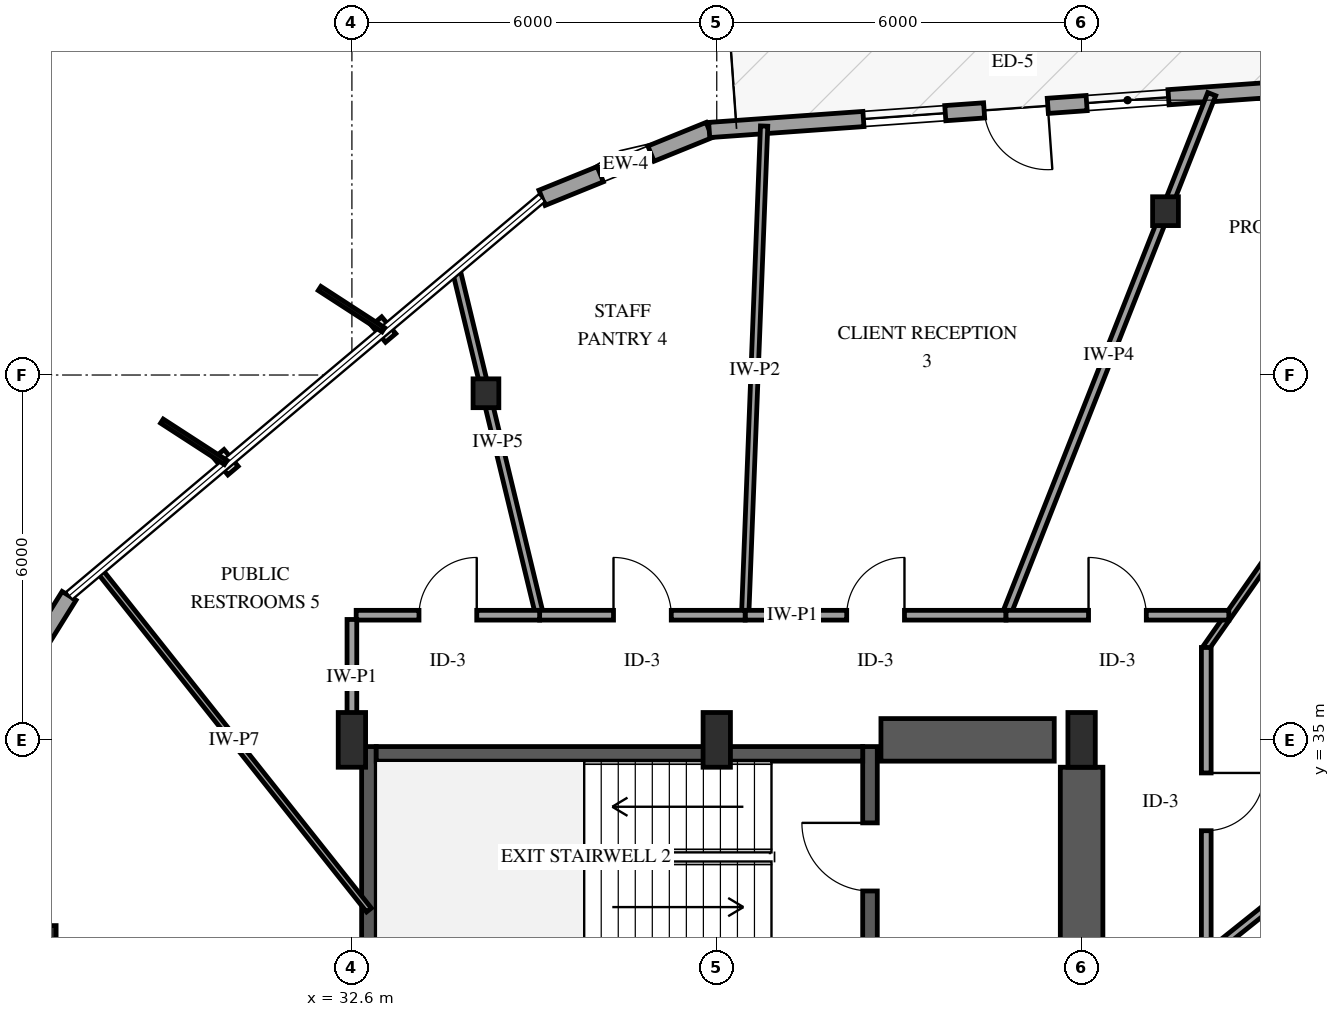
"""IFC4 building model, lengths in metres.
Left out: names, types, materials, properties, quantities, classifications, styles, units other than length and angle.
Written with IfcOpenShell. Run it as: python <this file> out.ifc"""

import sys

from ifc_helpers import new_model, si_unit, direction, frame, frame_2d, origin, origin_2d, place, context, subcontext, project, spatial, rectangle, i_section, extrude, element, fill, save


model = new_model("IFC4")
c1 = context("Model", 3, precision=1e-05, world=origin(), true_north=direction((0.0, 1.0)))
c2 = subcontext(c1, "Body", "Model", "MODEL_VIEW")
j1 = project(units=[si_unit("LENGTHUNIT", "METRE"), si_unit("PLANEANGLEUNIT", "RADIAN")], contexts=[c1])
p1 = place(None, origin())
s1 = spatial("IfcSite", under=j1, at=p1, CompositionType="ELEMENT")
p2 = place(p1, origin())
s2 = spatial("IfcBuilding", under=s1, at=p2, CompositionType="ELEMENT")
p3 = place(p2, frame((0.0, 0.0, 42.6)))
s3 = spatial("IfcBuildingStorey", under=s2, at=p3, CompositionType="ELEMENT", Elevation=42.6)
p4 = place(p3, frame((32.88, 31.26, 0.0), z_axis=(0.0, 0.0, 1.0), x_axis=(0.0, 1.0, 0.0)))
e1 = element("IfcWall", 1, at=p4, inside=s3, PredefinedType="SHEAR", context=c2, shape_type="SweptSolid", body=[
    extrude(rectangle(XDim=3.63, YDim=0.24, at=frame_2d((1.815, 0.0))), origin(), (0.0, 0.0, 1.0), 4.0),
])
p5 = place(p3, frame((41.12, 31.26, 0.0), z_axis=(0.0, 0.0, 1.0), x_axis=(0.0, 1.0, 0.0)))
e2 = element("IfcWall", 2, at=p5, inside=s3, PredefinedType="SHEAR", context=c2, shape_type="SweptSolid", body=[
    extrude(rectangle(XDim=3.63, YDim=0.24, at=frame_2d((1.815, 0.0))), origin(), (0.0, 0.0, 1.0), 4.0),
])
p6 = place(p5, frame((1.255, 0.0, 0.0)))
e3 = element("IfcOpeningElement", 3, at=p6, cuts=e2, PredefinedType="OPENING", context=c2, shape_type="SweptSolid", body=[
    extrude(rectangle(XDim=1.12, YDim=2.15, at=frame_2d((0.56, 1.075))), frame((0.0, 0.13, 0.0), z_axis=(0.0, -1.0, 0.0), x_axis=(1.0, 0.0, 0.0)), (0.0, 0.0, 1.0), 0.26),
])
p7 = place(p3, frame((33.0, 34.77, 0.0), z_axis=(0.0, 0.0, 1.0), x_axis=(1.0, 0.0, 0.0)))
e4 = element("IfcWall", 4, at=p7, inside=s3, PredefinedType="SHEAR", context=c2, shape_type="SweptSolid", body=[
    extrude(rectangle(XDim=8.0, YDim=0.24, at=frame_2d((4.0, 0.0))), origin(), (0.0, 0.0, 1.0), 4.0),
])
p8 = place(p3, frame((41.3, 35.0, 0.0), z_axis=(0.0, 0.0, 1.0), x_axis=(1.0, 0.0, 0.0)))
e5 = element("IfcWall", 5, at=p8, inside=s3, PredefinedType="SHEAR", context=c2, shape_type="SweptSolid", body=[
    extrude(rectangle(XDim=2.85, YDim=0.7, at=frame_2d((1.425, 0.0))), origin(), (0.0, 0.0, 1.0), 4.0),
])
p9 = place(p3, frame((44.6, 29.8, 0.0), z_axis=(0.0, 0.0, 1.0), x_axis=(0.0, 1.0, 0.0)))
e6 = element("IfcWall", 6, at=p9, inside=s3, PredefinedType="SHEAR", context=c2, shape_type="SweptSolid", body=[
    extrude(rectangle(XDim=4.75, YDim=0.7, at=frame_2d((2.375, 0.0))), origin(), (0.0, 0.0, 1.0), 4.0),
])
for number, where, z_axis, x_axis in (
    (7, (32.6, 35.0, 0.0), (0.0, 0.0, 1.0), (1.0, 0.0, 0.0)),
    (8, (38.6, 35.0, 0.0), (0.0, 0.0, 1.0), (1.0, 0.0, 0.0)),
    (9, (44.6, 35.0, 0.0), (0.0, 0.0, 1.0), (1.0, 0.0, 0.0)),
):
    element("IfcColumn", number, at=place(p3, frame(where, z_axis=z_axis, x_axis=x_axis)), inside=s3, PredefinedType="PILASTER", context=c2, shape_type="SweptSolid", body=[
        extrude(rectangle(XDim=0.45, YDim=0.9, at=origin_2d()), origin(), (0.0, 0.0, 1.0), 4.0),
    ])
for number, where, z_axis, x_axis in (
    (10, (45.98, 43.694, 0.0), (0.0, 0.0, 1.0), (1.0, 0.0, 0.0)),
    (11, (34.804, 40.7, 0.0), (0.0, 0.0, 1.0), (1.0, 0.0, 0.0)),
    (12, (27.523, 31.708, 0.0), (0.0, 0.0, 1.0), (1.0, 0.0, 0.0)),
):
    element("IfcColumn", number, at=place(p3, frame(where, z_axis=z_axis, x_axis=x_axis)), inside=s3, PredefinedType="COLUMN", context=c2, shape_type="SweptSolid", body=[
        extrude(i_section(OverallWidth=0.424, OverallDepth=0.474, WebThickness=0.048, FlangeThickness=0.077, FilletRadius=0.038, at=origin_2d()), origin(), (0.0, 0.0, 1.0), 4.0),
    ])
p10 = place(p3, frame((38.476, 45.029, 0.0), z_axis=(0.0, 0.0, 1.0), x_axis=(-0.926649408299, -0.375926687132, 0.0)))
e13 = element("IfcWall", 13, at=p10, inside=s3, PredefinedType="SOLIDWALL", context=c2, shape_type="SweptSolid", body=[
    extrude(rectangle(XDim=2.967, YDim=0.27, at=frame_2d((1.483, 0.0))), origin(), (0.0, 0.0, 1.0), 3.079),
])
p11 = place(p10, frame((1.033, 0.0, 0.75)))
e14 = element("IfcOpeningElement", 14, at=p11, cuts=e13, PredefinedType="OPENING", context=c2, shape_type="SweptSolid", body=[
    extrude(rectangle(XDim=0.9, YDim=1.5, at=frame_2d((0.45, 0.75))), frame((0.0, 0.145, 0.0), z_axis=(0.0, -1.0, 0.0), x_axis=(1.0, 0.0, 0.0)), (0.0, 0.0, 1.0), 0.29),
])
p12 = place(p3, frame((48.615, 45.752, 0.0), z_axis=(0.0, 0.0, 1.0), x_axis=(-0.997466374724, -0.071139519923, 0.0)))
e15 = element("IfcWall", 15, at=p12, inside=s3, PredefinedType="SOLIDWALL", context=c2, shape_type="SweptSolid", body=[
    extrude(rectangle(XDim=10.165, YDim=0.25, at=frame_2d((5.083, 0.0))), origin(), (0.0, 0.0, 1.0), 3.079),
])
p13 = place(p12, frame((4.583, 0.0, 0.0)))
e16 = element("IfcOpeningElement", 16, at=p13, cuts=e15, PredefinedType="OPENING", context=c2, shape_type="SweptSolid", body=[
    extrude(rectangle(XDim=1.05, YDim=2.15, at=frame_2d((0.525, 1.075))), frame((0.0, 0.135, 0.0), z_axis=(0.0, -1.0, 0.0), x_axis=(1.0, 0.0, 0.0)), (0.0, 0.0, 1.0), 0.27),
])
p14 = place(p12, frame((2.593, 0.0, 0.72)))
e17 = element("IfcOpeningElement", 17, at=p14, cuts=e15, PredefinedType="OPENING", context=c2, shape_type="SweptSolid", body=[
    extrude(rectangle(XDim=1.35, YDim=1.65, at=frame_2d((0.675, 0.825))), frame((0.0, 0.135, 0.0), z_axis=(0.0, -1.0, 0.0), x_axis=(1.0, 0.0, 0.0)), (0.0, 0.0, 1.0), 0.27),
])
p15 = place(p12, frame((6.273, 0.0, 0.72)))
e18 = element("IfcOpeningElement", 18, at=p15, cuts=e15, PredefinedType="OPENING", context=c2, shape_type="SweptSolid", body=[
    extrude(rectangle(XDim=1.35, YDim=1.65, at=frame_2d((0.675, 0.825))), frame((0.0, 0.135, 0.0), z_axis=(0.0, -1.0, 0.0), x_axis=(1.0, 0.0, 0.0)), (0.0, 0.0, 1.0), 0.27),
])
p16 = place(p3, frame((27.949, 37.369, 0.0), z_axis=(0.0, 0.0, 1.0), x_axis=(-0.528777761123, -0.848760319137, 0.0)))
e19 = element("IfcWall", 19, at=p16, inside=s3, PredefinedType="SOLIDWALL", context=c2, shape_type="SweptSolid", body=[
    extrude(rectangle(XDim=2.967, YDim=0.27, at=frame_2d((1.483, 0.0))), origin(), (0.0, 0.0, 1.0), 3.079),
])
p17 = place(p16, frame((1.033, 0.0, 0.75)))
e20 = element("IfcOpeningElement", 20, at=p17, cuts=e19, PredefinedType="OPENING", context=c2, shape_type="SweptSolid", body=[
    extrude(rectangle(XDim=0.9, YDim=1.5, at=frame_2d((0.45, 0.75))), frame((0.0, 0.145, 0.0), z_axis=(0.0, -1.0, 0.0), x_axis=(1.0, 0.0, 0.0)), (0.0, 0.0, 1.0), 0.29),
])
p18 = place(p3, frame((46.65, 31.442, 0.0), z_axis=(0.0, 0.0, 1.0), x_axis=(0.780828986404, 0.6247448231, 0.0)))
e21 = element("IfcWall", 21, at=p18, inside=s3, PredefinedType="PARTITIONING", context=c2, shape_type="SweptSolid", body=[
    extrude(rectangle(XDim=14.953, YDim=0.13, at=frame_2d((7.477, 0.0))), origin(), (0.0, 0.0, 1.0), 3.7),
])
p19 = place(p3, frame((46.65, 36.519, 0.0), z_axis=(0.0, 0.0, 1.0), x_axis=(0.572892452381, 0.819630549702, 0.0)))
e22 = element("IfcWall", 22, at=p19, inside=s3, PredefinedType="PARTITIONING", context=c2, shape_type="SweptSolid", body=[
    extrude(rectangle(XDim=9.807, YDim=0.11, at=frame_2d((4.903, 0.0))), origin(), (0.0, 0.0, 1.0), 3.7),
])
p20 = place(p3, frame((43.357, 37.05, 0.0), z_axis=(0.0, 0.0, 1.0), x_axis=(0.367224458335, 0.930132354668, 0.0)))
e23 = element("IfcWall", 23, at=p20, inside=s3, PredefinedType="PARTITIONING", context=c2, shape_type="SweptSolid", body=[
    extrude(rectangle(XDim=9.212, YDim=0.14, at=frame_2d((4.606, 0.0))), origin(), (0.0, 0.0, 1.0), 2.995),
])
p21 = place(p3, frame((39.067, 37.05, 0.0), z_axis=(0.0, 0.0, 1.0), x_axis=(0.038759247382, 0.999248578054, 0.0)))
e24 = element("IfcWall", 24, at=p21, inside=s3, PredefinedType="PARTITIONING", context=c2, shape_type="SweptSolid", body=[
    extrude(rectangle(XDim=8.05, YDim=0.12, at=frame_2d((4.025, 0.0))), origin(), (0.0, 0.0, 1.0), 3.7),
])
p22 = place(p3, frame((32.88, 32.202, 0.0), z_axis=(0.0, 0.0, 1.0), x_axis=(-0.621839537778, 0.783144679645, 0.0)))
e25 = element("IfcWall", 25, at=p22, inside=s3, PredefinedType="PARTITIONING", context=c2, shape_type="SweptSolid", body=[
    extrude(rectangle(XDim=7.132, YDim=0.1, at=frame_2d((3.566, 0.0))), origin(), (0.0, 0.0, 1.0), 3.7),
])
p23 = place(p3, frame((35.687, 37.05, 0.0), z_axis=(0.0, 0.0, 1.0), x_axis=(-0.234963384599, 0.97200422216, 0.0)))
e26 = element("IfcWall", 26, at=p23, inside=s3, PredefinedType="PARTITIONING", context=c2, shape_type="SweptSolid", body=[
    extrude(rectangle(XDim=5.84, YDim=0.13, at=frame_2d((2.92, 0.0))), origin(), (0.0, 0.0, 1.0), 2.995),
])
p24 = place(p3, frame((46.65, 36.519, 0.0), z_axis=(0.0, 0.0, 1.0), x_axis=(0.0, -1.0, 0.0)))
e27 = element("IfcWall", 27, at=p24, inside=s3, PredefinedType="PARTITIONING", context=c2, shape_type="SweptSolid", body=[
    extrude(rectangle(XDim=5.077, YDim=0.16, at=frame_2d((2.539, 0.0))), origin(), (0.0, 0.0, 1.0), 3.7),
])
p25 = place(p24, frame((2.063, 0.0, 0.0)))
e28 = element("IfcOpeningElement", 28, at=p25, cuts=e27, PredefinedType="OPENING", context=c2, shape_type="SweptSolid", body=[
    extrude(rectangle(XDim=0.95, YDim=2.15, at=frame_2d((0.475, 1.075))), frame((0.0, 0.09, 0.0), z_axis=(0.0, -1.0, 0.0), x_axis=(1.0, 0.0, 0.0)), (0.0, 0.0, 1.0), 0.18),
])
p26 = place(p3, frame((39.067, 37.05, 0.0), z_axis=(0.0, 0.0, 1.0), x_axis=(1.0, 0.0, 0.0)))
e29 = element("IfcWall", 29, at=p26, inside=s3, PredefinedType="PARTITIONING", context=c2, shape_type="SweptSolid", body=[
    extrude(rectangle(XDim=4.29, YDim=0.16, at=frame_2d((2.145, 0.0))), origin(), (0.0, 0.0, 1.0), 3.7),
])
p27 = place(p26, frame((1.67, 0.0, 0.0)))
e30 = element("IfcOpeningElement", 30, at=p27, cuts=e29, PredefinedType="OPENING", context=c2, shape_type="SweptSolid", body=[
    extrude(rectangle(XDim=0.95, YDim=2.15, at=frame_2d((0.475, 1.075))), frame((0.0, 0.09, 0.0), z_axis=(0.0, -1.0, 0.0), x_axis=(1.0, 0.0, 0.0)), (0.0, 0.0, 1.0), 0.18),
])
p28 = place(p3, frame((43.357, 37.05, 0.0), z_axis=(0.0, 0.0, 1.0), x_axis=(1.0, 0.0, 0.0)))
e31 = element("IfcWall", 31, at=p28, inside=s3, PredefinedType="PARTITIONING", context=c2, shape_type="SweptSolid", body=[
    extrude(rectangle(XDim=3.664, YDim=0.16, at=frame_2d((1.832, 0.0))), origin(), (0.0, 0.0, 1.0), 3.7),
])
p29 = place(p28, frame((1.357, 0.0, 0.0)))
e32 = element("IfcOpeningElement", 32, at=p29, cuts=e31, PredefinedType="OPENING", context=c2, shape_type="SweptSolid", body=[
    extrude(rectangle(XDim=0.95, YDim=2.15, at=frame_2d((0.475, 1.075))), frame((0.0, 0.09, 0.0), z_axis=(0.0, -1.0, 0.0), x_axis=(1.0, 0.0, 0.0)), (0.0, 0.0, 1.0), 0.18),
])
p30 = place(p3, frame((35.687, 37.05, 0.0), z_axis=(0.0, 0.0, 1.0), x_axis=(1.0, 0.0, 0.0)))
e33 = element("IfcWall", 33, at=p30, inside=s3, PredefinedType="PARTITIONING", context=c2, shape_type="SweptSolid", body=[
    extrude(rectangle(XDim=3.38, YDim=0.16, at=frame_2d((1.69, 0.0))), origin(), (0.0, 0.0, 1.0), 3.7),
])
p31 = place(p30, frame((1.215, 0.0, 0.0)))
e34 = element("IfcOpeningElement", 34, at=p31, cuts=e33, PredefinedType="OPENING", context=c2, shape_type="SweptSolid", body=[
    extrude(rectangle(XDim=0.95, YDim=2.15, at=frame_2d((0.475, 1.075))), frame((0.0, 0.09, 0.0), z_axis=(0.0, -1.0, 0.0), x_axis=(1.0, 0.0, 0.0)), (0.0, 0.0, 1.0), 0.18),
])
p32 = place(p3, frame((32.67, 37.05, 0.0), z_axis=(0.0, 0.0, 1.0), x_axis=(1.0, 0.0, 0.0)))
e35 = element("IfcWall", 35, at=p32, inside=s3, PredefinedType="PARTITIONING", context=c2, shape_type="SweptSolid", body=[
    extrude(rectangle(XDim=3.017, YDim=0.16, at=frame_2d((1.509, 0.0))), origin(), (0.0, 0.0, 1.0), 3.7),
])
p33 = place(p32, frame((1.033, 0.0, 0.0)))
e36 = element("IfcOpeningElement", 36, at=p33, cuts=e35, PredefinedType="OPENING", context=c2, shape_type="SweptSolid", body=[
    extrude(rectangle(XDim=0.95, YDim=2.15, at=frame_2d((0.475, 1.075))), frame((0.0, 0.09, 0.0), z_axis=(0.0, -1.0, 0.0), x_axis=(1.0, 0.0, 0.0)), (0.0, 0.0, 1.0), 0.18),
])
p34 = place(p3, frame((32.6, 35.07, 0.0), z_axis=(0.0, 0.0, 1.0), x_axis=(0.0, 1.0, 0.0)))
e37 = element("IfcWall", 37, at=p34, inside=s3, PredefinedType="PARTITIONING", context=c2, shape_type="SweptSolid", body=[
    extrude(rectangle(XDim=1.91, YDim=0.16, at=frame_2d((0.955, 0.0))), origin(), (0.0, 0.0, 1.0), 3.7),
])
p35 = place(p11, origin())
e38 = element("IfcWindow", 38, at=p35, inside=s3, PartitioningType="SINGLE_PANEL", PredefinedType="WINDOW", context=c2, shape_type="SweptSolid", body=[
    extrude(rectangle(XDim=0.9, YDim=1.5, at=frame_2d((0.45, 0.75))), frame((0.0, 0.03, 0.0), z_axis=(0.0, -1.0, 0.0), x_axis=(1.0, 0.0, 0.0)), (0.0, 0.0, 1.0), 0.06),
])
fill(e14, e38)
p36 = place(p13, origin())
e39 = element("IfcDoor", 39, at=p36, inside=s3, OperationType="SINGLE_SWING_LEFT", PredefinedType="DOOR", context=c2, shape_type="SweptSolid", body=[
    extrude(rectangle(XDim=1.05, YDim=2.15, at=frame_2d((0.525, 1.075))), frame((0.0, 0.025, 0.0), z_axis=(0.0, -1.0, 0.0), x_axis=(1.0, 0.0, 0.0)), (0.0, 0.0, 1.0), 0.05),
])
fill(e16, e39)
p37 = place(p14, origin())
e40 = element("IfcWindow", 40, at=p37, inside=s3, PartitioningType="SINGLE_PANEL", PredefinedType="WINDOW", context=c2, shape_type="SweptSolid", body=[
    extrude(rectangle(XDim=1.35, YDim=1.65, at=frame_2d((0.675, 0.825))), frame((0.0, 0.03, 0.0), z_axis=(0.0, -1.0, 0.0), x_axis=(1.0, 0.0, 0.0)), (0.0, 0.0, 1.0), 0.06),
])
fill(e17, e40)
p38 = place(p15, origin())
e41 = element("IfcWindow", 41, at=p38, inside=s3, PartitioningType="SINGLE_PANEL", PredefinedType="WINDOW", context=c2, shape_type="SweptSolid", body=[
    extrude(rectangle(XDim=1.35, YDim=1.65, at=frame_2d((0.675, 0.825))), frame((0.0, 0.03, 0.0), z_axis=(0.0, -1.0, 0.0), x_axis=(1.0, 0.0, 0.0)), (0.0, 0.0, 1.0), 0.06),
])
fill(e18, e41)
p39 = place(p6, origin())
e42 = element("IfcDoor", 42, at=p39, inside=s3, OperationType="SINGLE_SWING_RIGHT", PredefinedType="DOOR", context=c2, shape_type="SweptSolid", body=[
    extrude(rectangle(XDim=1.12, YDim=2.15, at=frame_2d((0.56, 1.075))), frame((0.0, 0.025, 0.0), z_axis=(0.0, -1.0, 0.0), x_axis=(1.0, 0.0, 0.0)), (0.0, 0.0, 1.0), 0.05),
])
fill(e3, e42)
p40 = place(p25, origin())
e43 = element("IfcDoor", 43, at=p40, inside=s3, OperationType="SINGLE_SWING_LEFT", PredefinedType="DOOR", context=c2, shape_type="SweptSolid", body=[
    extrude(rectangle(XDim=0.95, YDim=2.15, at=frame_2d((0.475, 1.075))), frame((0.0, 0.025, 0.0), z_axis=(0.0, -1.0, 0.0), x_axis=(1.0, 0.0, 0.0)), (0.0, 0.0, 1.0), 0.05),
])
fill(e28, e43)
p41 = place(p27, origin())
e44 = element("IfcDoor", 44, at=p41, inside=s3, OperationType="SINGLE_SWING_RIGHT", PredefinedType="DOOR", context=c2, shape_type="SweptSolid", body=[
    extrude(rectangle(XDim=0.95, YDim=2.15, at=frame_2d((0.475, 1.075))), frame((0.0, 0.025, 0.0), z_axis=(0.0, -1.0, 0.0), x_axis=(1.0, 0.0, 0.0)), (0.0, 0.0, 1.0), 0.05),
])
fill(e30, e44)
p42 = place(p29, origin())
e45 = element("IfcDoor", 45, at=p42, inside=s3, OperationType="SINGLE_SWING_LEFT", PredefinedType="DOOR", context=c2, shape_type="SweptSolid", body=[
    extrude(rectangle(XDim=0.95, YDim=2.15, at=frame_2d((0.475, 1.075))), frame((0.0, 0.025, 0.0), z_axis=(0.0, -1.0, 0.0), x_axis=(1.0, 0.0, 0.0)), (0.0, 0.0, 1.0), 0.05),
])
fill(e32, e45)
p43 = place(p31, origin())
e46 = element("IfcDoor", 46, at=p43, inside=s3, OperationType="SINGLE_SWING_LEFT", PredefinedType="DOOR", context=c2, shape_type="SweptSolid", body=[
    extrude(rectangle(XDim=0.95, YDim=2.15, at=frame_2d((0.475, 1.075))), frame((0.0, 0.025, 0.0), z_axis=(0.0, -1.0, 0.0), x_axis=(1.0, 0.0, 0.0)), (0.0, 0.0, 1.0), 0.05),
])
fill(e34, e46)
p44 = place(p33, origin())
e47 = element("IfcDoor", 47, at=p44, inside=s3, OperationType="SINGLE_SWING_RIGHT", PredefinedType="DOOR", context=c2, shape_type="SweptSolid", body=[
    extrude(rectangle(XDim=0.95, YDim=2.15, at=frame_2d((0.475, 1.075))), frame((0.0, 0.025, 0.0), z_axis=(0.0, -1.0, 0.0), x_axis=(1.0, 0.0, 0.0)), (0.0, 0.0, 1.0), 0.05),
])
fill(e36, e47)
save(model, sys.argv[1])
